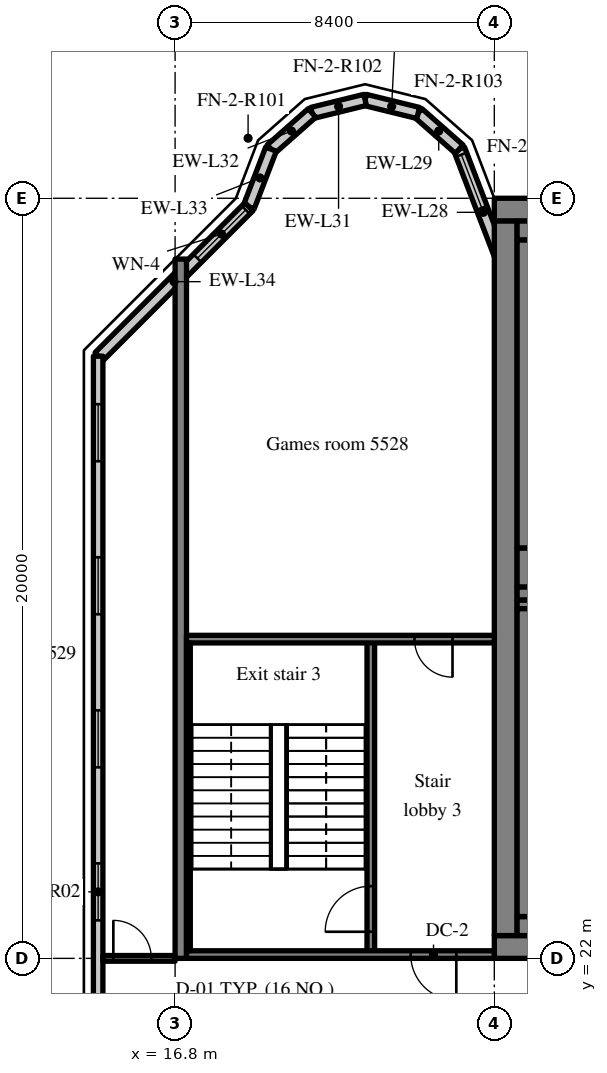
"""IFC4 building model, lengths in metres.
Left out: names, types, materials, properties, quantities, classifications, styles, units other than length and angle.
Written with IfcOpenShell. Run it as: python <this file> out.ifc"""

import sys

from ifc_helpers import new_model, si_unit, direction, frame, frame_2d, origin, place, context, subcontext, project, spatial, rectangle, extrude, source, transform, mapped, element, fill, save


model = new_model("IFC4")
c1 = context("Model", 3, precision=1e-05, world=origin(), true_north=direction((0.0, 1.0)))
c2 = subcontext(c1, "Body", "Model", "MODEL_VIEW")
j1 = project(units=[si_unit("LENGTHUNIT", "METRE"), si_unit("PLANEANGLEUNIT", "RADIAN")], contexts=[c1])
p1 = place(None, origin())
s1 = spatial("IfcSite", under=j1, at=p1, CompositionType="ELEMENT")
p2 = place(p1, origin())
s2 = spatial("IfcBuilding", under=s1, at=p2, CompositionType="ELEMENT")
p3 = place(p2, frame((0.0, 0.0, 229.6)))
s3 = spatial("IfcBuildingStorey", under=s2, at=p3, CompositionType="ELEMENT", Elevation=229.6)
m1 = source(origin(), c2, "Body", "SweptSolid", [
    extrude(rectangle(XDim=50.4, YDim=0.6, at=frame_2d((25.2, 0.0))), origin(), (0.0, 0.0, 1.0), 3.62),
])
p4 = place(p3, frame((25.2, 22.3, 0.0), z_axis=(0.0, 0.0, 1.0), x_axis=(1.0, 0.0, 0.0)))
e1 = element("IfcWall", 1, at=p4, inside=s3, PredefinedType="SHEAR", context=c2, shape_type="MappedRepresentation", body=[
    mapped(m1, transform((0.0, 0.0, 0.0), scale=1.0)),
])
m2 = source(origin(), c2, "Body", "SweptSolid", [
    extrude(rectangle(XDim=1.8, YDim=2.1, at=frame_2d((0.9, 1.05))), frame((0.0, 0.31, 0.0), z_axis=(0.0, -1.0, 0.0), x_axis=(1.0, 0.0, 0.0)), (0.0, 0.0, 1.0), 0.62),
])
p5 = place(p4, frame((15.9, 0.0, 0.0)))
e2 = element("IfcOpeningElement", 2, at=p5, cuts=e1, PredefinedType="OPENING", context=c2, shape_type="MappedRepresentation", body=[
    mapped(m2, transform((0.0, 0.0, 0.0), scale=1.0)),
])
m3 = source(origin(), c2, "Body", "SweptSolid", [
    extrude(rectangle(XDim=0.9, YDim=2.1, at=frame_2d((0.45, 1.05))), frame((0.0, 0.31, 0.0), z_axis=(0.0, -1.0, 0.0), x_axis=(1.0, 0.0, 0.0)), (0.0, 0.0, 1.0), 0.62),
])
p6 = place(p4, frame((11.187, 0.0, 0.0)))
e3 = element("IfcOpeningElement", 3, at=p6, cuts=e1, PredefinedType="OPENING", context=c2, shape_type="MappedRepresentation", body=[
    mapped(m3, transform((0.0, 0.0, 0.0), scale=1.0)),
])
p7 = place(p4, frame((21.513, 0.0, 0.0)))
e4 = element("IfcOpeningElement", 4, at=p7, cuts=e1, PredefinedType="OPENING", context=c2, shape_type="MappedRepresentation", body=[
    mapped(m3, transform((0.0, 0.0, 0.0), scale=1.0)),
])
p8 = place(p4, frame((32.7, 0.0, 0.0)))
e5 = element("IfcOpeningElement", 5, at=p8, cuts=e1, PredefinedType="OPENING", context=c2, shape_type="MappedRepresentation", body=[
    mapped(m2, transform((0.0, 0.0, 0.0), scale=1.0)),
])
m4 = source(origin(), c2, "Body", "SweptSolid", [
    extrude(rectangle(XDim=1.2, YDim=2.1, at=frame_2d((0.6, 1.05))), frame((0.0, 0.31, 0.0), z_axis=(0.0, -1.0, 0.0), x_axis=(1.0, 0.0, 0.0)), (0.0, 0.0, 1.0), 0.62),
])
p9 = place(p4, frame((6.488, 0.0, 0.0)))
e6 = element("IfcOpeningElement", 6, at=p9, cuts=e1, PredefinedType="OPENING", context=c2, shape_type="MappedRepresentation", body=[
    mapped(m4, transform((0.0, 0.0, 0.0), scale=1.0)),
])
p10 = place(p4, frame((47.925, 0.0, 0.0)))
e7 = element("IfcOpeningElement", 7, at=p10, cuts=e1, PredefinedType="OPENING", context=c2, shape_type="MappedRepresentation", body=[
    mapped(m4, transform((0.0, 0.0, 0.0), scale=1.0)),
])
p11 = place(p3, frame((25.2, 41.7, 0.0), z_axis=(0.0, 0.0, 1.0), x_axis=(1.0, 0.0, 0.0)))
e8 = element("IfcWall", 8, at=p11, inside=s3, PredefinedType="SHEAR", context=c2, shape_type="MappedRepresentation", body=[
    mapped(m1, transform((0.0, 0.0, 0.0), scale=1.0)),
])
m5 = source(origin(), c2, "Body", "SweptSolid", [
    extrude(rectangle(XDim=18.8, YDim=0.6, at=frame_2d((9.4, 0.0))), origin(), (0.0, 0.0, 1.0), 3.62),
])
p12 = place(p3, frame((25.5, 22.6, 0.0), z_axis=(0.0, 0.0, 1.0), x_axis=(0.0, 1.0, 0.0)))
e9 = element("IfcWall", 9, at=p12, inside=s3, PredefinedType="SHEAR", context=c2, shape_type="MappedRepresentation", body=[
    mapped(m5, transform((0.0, 0.0, 0.0), scale=1.0)),
])
m6 = source(origin(), c2, "Body", "SweptSolid", [
    extrude(rectangle(XDim=7.625, YDim=0.35, at=frame_2d((3.812, 0.0))), origin(), (0.0, 0.0, 1.0), 3.62),
])
p13 = place(p3, frame((25.8, 31.6, 0.0), z_axis=(0.0, 0.0, 1.0), x_axis=(1.0, 0.0, 0.0)))
e10 = element("IfcWall", 10, at=p13, inside=s3, PredefinedType="SHEAR", context=c2, shape_type="MappedRepresentation", body=[
    mapped(m6, transform((0.0, 0.0, 0.0), scale=1.0)),
])
m7 = source(origin(), c2, "Body", "SweptSolid", [
    extrude(rectangle(XDim=1.1, YDim=2.1, at=frame_2d((0.55, 1.05))), frame((0.0, 0.185, 0.0), z_axis=(0.0, -1.0, 0.0), x_axis=(1.0, 0.0, 0.0)), (0.0, 0.0, 1.0), 0.37),
])
p14 = place(p13, frame((5.938, 0.0, 0.0)))
e11 = element("IfcOpeningElement", 11, at=p14, cuts=e10, PredefinedType="OPENING", context=c2, shape_type="MappedRepresentation", body=[
    mapped(m7, transform((0.0, 0.0, 0.0), scale=1.0)),
])
m8 = source(origin(), c2, "Body", "SweptSolid", [
    extrude(rectangle(XDim=18.4, YDim=0.3, at=frame_2d((9.2, 0.0))), origin(), (0.0, 0.0, 1.0), 3.62),
])
p15 = place(p3, frame((16.95, 22.0, 0.0), z_axis=(0.0, 0.0, 1.0), x_axis=(0.0, 1.0, 0.0)))
e12 = element("IfcWall", 12, at=p15, inside=s3, PredefinedType="SHEAR", context=c2, shape_type="MappedRepresentation", body=[
    mapped(m8, transform((0.0, 0.0, 0.0), scale=1.0)),
])
m9 = source(origin(), c2, "Body", "SweptSolid", [
    extrude(rectangle(XDim=3.559, YDim=0.3, at=frame_2d((1.78, 0.0))), origin(), (0.0, 0.0, 1.0), 3.62),
])
p16 = place(p3, frame((25.55, 39.969, 0.0), z_axis=(0.0, 0.0, 1.0), x_axis=(-0.35779745313, 0.933799219604, 0.0)))
e13 = element("IfcWall", 13, at=p16, inside=s3, PredefinedType="SOLIDWALL", context=c2, shape_type="MappedRepresentation", body=[
    mapped(m9, transform((0.0, 0.0, 0.0), scale=1.0)),
])
m10 = source(origin(), c2, "Body", "SweptSolid", [
    extrude(rectangle(XDim=1.5, YDim=2.0, at=frame_2d((0.75, 1.0))), frame((0.0, 0.16, 0.0), z_axis=(0.0, -1.0, 0.0), x_axis=(1.0, 0.0, 0.0)), (0.0, 0.0, 1.0), 0.32),
])
p17 = place(p16, frame((1.903, 0.0, 0.9)))
e14 = element("IfcOpeningElement", 14, at=p17, cuts=e13, PredefinedType="OPENING", context=c2, shape_type="MappedRepresentation", body=[
    mapped(m10, transform((0.0, 0.0, 0.0), scale=1.0)),
])
m11 = source(origin(), c2, "Body", "SweptSolid", [
    extrude(rectangle(XDim=1.44, YDim=0.3, at=frame_2d((0.72, 0.0))), origin(), (0.0, 0.0, 1.0), 3.62),
])
p18 = place(p3, frame((24.277, 43.292, 0.0), z_axis=(0.0, 0.0, 1.0), x_axis=(-0.749649827867, 0.661834673902, 0.0)))
e15 = element("IfcWall", 15, at=p18, inside=s3, PredefinedType="SOLIDWALL", context=c2, shape_type="MappedRepresentation", body=[
    mapped(m11, transform((0.0, 0.0, 0.0), scale=1.0)),
])
m12 = source(origin(), c2, "Body", "SweptSolid", [
    extrude(rectangle(XDim=1.438, YDim=0.3, at=frame_2d((0.719, 0.0))), origin(), (0.0, 0.0, 1.0), 3.62),
])
p19 = place(p3, frame((23.197, 44.245, 0.0), z_axis=(0.0, 0.0, 1.0), x_axis=(-0.971152283879, 0.238460146601, 0.0)))
e16 = element("IfcWall", 16, at=p19, inside=s3, PredefinedType="SOLIDWALL", context=c2, shape_type="MappedRepresentation", body=[
    mapped(m12, transform((0.0, 0.0, 0.0), scale=1.0)),
])
m13 = source(origin(), c2, "Body", "SweptSolid", [
    extrude(rectangle(XDim=1.439, YDim=0.3, at=frame_2d((0.719, 0.0))), origin(), (0.0, 0.0, 1.0), 3.62),
])
p20 = place(p3, frame((21.8, 44.588, 0.0), z_axis=(0.0, 0.0, 1.0), x_axis=(-0.971161932466, -0.238420848351, 0.0)))
e17 = element("IfcWall", 17, at=p20, inside=s3, PredefinedType="SOLIDWALL", context=c2, shape_type="MappedRepresentation", body=[
    mapped(m13, transform((0.0, 0.0, 0.0), scale=1.0)),
])
m14 = source(origin(), c2, "Body", "SweptSolid", [
    extrude(rectangle(XDim=1.44, YDim=0.3, at=frame_2d((0.72, 0.0))), origin(), (0.0, 0.0, 1.0), 3.62),
])
p21 = place(p3, frame((20.403, 44.245, 0.0), z_axis=(0.0, 0.0, 1.0), x_axis=(-0.74957555648, -0.661918790432, 0.0)))
e18 = element("IfcWall", 18, at=p21, inside=s3, PredefinedType="SOLIDWALL", context=c2, shape_type="MappedRepresentation", body=[
    mapped(m14, transform((0.0, 0.0, 0.0), scale=1.0)),
])
m15 = source(origin(), c2, "Body", "SweptSolid", [
    extrude(rectangle(XDim=1.622, YDim=0.3, at=frame_2d((0.811, 0.0))), origin(), (0.0, 0.0, 1.0), 3.62),
])
p22 = place(p3, frame((19.323, 43.292, 0.0), z_axis=(0.0, 0.0, 1.0), x_axis=(-0.357778527068, -0.933806471154, 0.0)))
e19 = element("IfcWall", 19, at=p22, inside=s3, PredefinedType="SOLIDWALL", context=c2, shape_type="MappedRepresentation", body=[
    mapped(m15, transform((0.0, 0.0, 0.0), scale=1.0)),
])
m16 = source(origin(), c2, "Body", "SweptSolid", [
    extrude(rectangle(XDim=5.576, YDim=0.3, at=frame_2d((2.788, 0.0))), origin(), (0.0, 0.0, 1.0), 3.62),
])
p23 = place(p3, frame((18.743, 41.777, 0.0), z_axis=(0.0, 0.0, 1.0), x_axis=(-0.707106781187, -0.707106781187, 0.0)))
e20 = element("IfcWall", 20, at=p23, inside=s3, PredefinedType="SOLIDWALL", context=c2, shape_type="MappedRepresentation", body=[
    mapped(m16, transform((0.0, 0.0, 0.0), scale=1.0)),
])
m17 = source(origin(), c2, "Body", "SweptSolid", [
    extrude(rectangle(XDim=1.8, YDim=1.5, at=frame_2d((0.9, 0.75))), frame((0.0, 0.16, 0.0), z_axis=(0.0, -1.0, 0.0), x_axis=(1.0, 0.0, 0.0)), (0.0, 0.0, 1.0), 0.32),
])
p24 = place(p23, frame((0.118, 0.0, 0.9)))
e21 = element("IfcOpeningElement", 21, at=p24, cuts=e20, PredefinedType="OPENING", context=c2, shape_type="MappedRepresentation", body=[
    mapped(m17, transform((0.0, 0.0, 0.0), scale=1.0)),
])
m18 = source(origin(), c2, "Body", "SweptSolid", [
    extrude(rectangle(XDim=28.189, YDim=0.25, at=frame_2d((14.095, 0.0))), origin(), (0.0, 0.0, 1.0), 3.62),
])
p25 = place(p3, frame((14.775, 37.845, 0.0), z_axis=(0.0, 0.0, 1.0), x_axis=(0.0, -1.0, 0.0)))
e22 = element("IfcWall", 22, at=p25, inside=s3, PredefinedType="SOLIDWALL", context=c2, shape_type="MappedRepresentation", body=[
    mapped(m18, transform((0.0, 0.0, 0.0), scale=1.0)),
])
m19 = source(origin(), c2, "Body", "SweptSolid", [
    extrude(rectangle(XDim=1.5, YDim=1.5, at=frame_2d((0.75, 0.75))), frame((0.0, 0.135, 0.0), z_axis=(0.0, -1.0, 0.0), x_axis=(1.0, 0.0, 0.0)), (0.0, 0.0, 1.0), 0.27),
])
p26 = place(p25, frame((1.263, 0.0, 0.9)))
e23 = element("IfcOpeningElement", 23, at=p26, cuts=e22, PredefinedType="OPENING", context=c2, shape_type="MappedRepresentation", body=[
    mapped(m19, transform((0.0, 0.0, 0.0), scale=1.0)),
])
p27 = place(p25, frame((5.291, 0.0, 0.9)))
e24 = element("IfcOpeningElement", 24, at=p27, cuts=e22, PredefinedType="OPENING", context=c2, shape_type="MappedRepresentation", body=[
    mapped(m19, transform((0.0, 0.0, 0.0), scale=1.0)),
])
p28 = place(p25, frame((9.318, 0.0, 0.9)))
e25 = element("IfcOpeningElement", 25, at=p28, cuts=e22, PredefinedType="OPENING", context=c2, shape_type="MappedRepresentation", body=[
    mapped(m19, transform((0.0, 0.0, 0.0), scale=1.0)),
])
p29 = place(p25, frame((13.345, 0.0, 0.9)))
e26 = element("IfcOpeningElement", 26, at=p29, cuts=e22, PredefinedType="OPENING", context=c2, shape_type="MappedRepresentation", body=[
    mapped(m19, transform((0.0, 0.0, 0.0), scale=1.0)),
])
p30 = place(p25, frame((17.372, 0.0, 0.9)))
e27 = element("IfcOpeningElement", 27, at=p30, cuts=e22, PredefinedType="OPENING", context=c2, shape_type="MappedRepresentation", body=[
    mapped(m19, transform((0.0, 0.0, 0.0), scale=1.0)),
])
p31 = place(p25, frame((21.399, 0.0, 0.9)))
e28 = element("IfcOpeningElement", 28, at=p31, cuts=e22, PredefinedType="OPENING", context=c2, shape_type="MappedRepresentation", body=[
    mapped(m19, transform((0.0, 0.0, 0.0), scale=1.0)),
])
p32 = place(p25, frame((25.426, 0.0, 0.9)))
e29 = element("IfcOpeningElement", 29, at=p32, cuts=e22, PredefinedType="OPENING", context=c2, shape_type="MappedRepresentation", body=[
    mapped(m19, transform((0.0, 0.0, 0.0), scale=1.0)),
])
m20 = source(origin(), c2, "Body", "SweptSolid", [
    extrude(rectangle(XDim=8.3, YDim=0.2, at=frame_2d((4.15, 0.0))), origin(), (0.0, 0.0, 1.0), 3.62),
])
p33 = place(p3, frame((21.95, 22.1, 0.0), z_axis=(0.0, 0.0, 1.0), x_axis=(0.0, 1.0, 0.0)))
e30 = element("IfcWall", 30, at=p33, inside=s3, PredefinedType="SOLIDWALL", context=c2, shape_type="MappedRepresentation", body=[
    mapped(m20, transform((0.0, 0.0, 0.0), scale=1.0)),
])
m21 = source(origin(), c2, "Body", "SweptSolid", [
    extrude(rectangle(XDim=1.2, YDim=2.1, at=frame_2d((0.6, 1.05))), frame((0.0, 0.11, 0.0), z_axis=(0.0, -1.0, 0.0), x_axis=(1.0, 0.0, 0.0)), (0.0, 0.0, 1.0), 0.22),
])
p34 = place(p33, frame((0.6, 0.0, 0.0)))
e31 = element("IfcOpeningElement", 31, at=p34, cuts=e30, PredefinedType="OPENING", context=c2, shape_type="MappedRepresentation", body=[
    mapped(m21, transform((0.0, 0.0, 0.0), scale=1.0)),
])
m22 = source(origin(), c2, "Body", "SweptSolid", [
    extrude(rectangle(XDim=8.1, YDim=0.2, at=frame_2d((4.05, 0.0))), origin(), (0.0, 0.0, 1.0), 3.62),
])
p35 = place(p3, frame((17.1, 22.1, 0.0), z_axis=(0.0, 0.0, 1.0), x_axis=(1.0, 0.0, 0.0)))
e32 = element("IfcWall", 32, at=p35, inside=s3, PredefinedType="SOLIDWALL", context=c2, shape_type="MappedRepresentation", body=[
    mapped(m22, transform((0.0, 0.0, 0.0), scale=1.0)),
])
p36 = place(p35, frame((5.9, 0.0, 0.0)))
e33 = element("IfcOpeningElement", 33, at=p36, cuts=e32, PredefinedType="OPENING", context=c2, shape_type="MappedRepresentation", body=[
    mapped(m21, transform((0.0, 0.0, 0.0), scale=1.0)),
])
p37 = place(p3, frame((17.1, 30.4, 0.0), z_axis=(0.0, 0.0, 1.0), x_axis=(1.0, 0.0, 0.0)))
e34 = element("IfcWall", 34, at=p37, inside=s3, PredefinedType="SOLIDWALL", context=c2, shape_type="MappedRepresentation", body=[
    mapped(m22, transform((0.0, 0.0, 0.0), scale=1.0)),
])
m23 = source(origin(), c2, "Body", "SweptSolid", [
    extrude(rectangle(XDim=1.0, YDim=2.1, at=frame_2d((0.5, 1.05))), frame((0.0, 0.11, 0.0), z_axis=(0.0, -1.0, 0.0), x_axis=(1.0, 0.0, 0.0)), (0.0, 0.0, 1.0), 0.22),
])
p38 = place(p37, frame((6.0, 0.0, 0.0)))
e35 = element("IfcOpeningElement", 35, at=p38, cuts=e34, PredefinedType="OPENING", context=c2, shape_type="MappedRepresentation", body=[
    mapped(m23, transform((0.0, 0.0, 0.0), scale=1.0)),
])
m24 = source(origin(), c2, "Body", "SweptSolid", [
    extrude(rectangle(XDim=5.15, YDim=0.5, at=frame_2d((2.575, 0.0))), origin(), (0.0, 0.0, 1.0), 3.62),
])
p39 = place(p3, frame((25.8, 22.85, 0.0), z_axis=(0.0, 0.0, 1.0), x_axis=(1.0, 0.0, 0.0)))
e36 = element("IfcWall", 36, at=p39, inside=s3, PredefinedType="SOLIDWALL", context=c2, shape_type="MappedRepresentation", body=[
    mapped(m24, transform((0.0, 0.0, 0.0), scale=1.0)),
])
m25 = source(origin(), c2, "Body", "SweptSolid", [
    extrude(rectangle(XDim=5.15, YDim=0.225, at=frame_2d((2.575, 0.0))), origin(), (0.0, 0.0, 1.0), 3.62),
])
p40 = place(p3, frame((25.8, 31.312, 0.0), z_axis=(0.0, 0.0, 1.0), x_axis=(1.0, 0.0, 0.0)))
e37 = element("IfcWall", 37, at=p40, inside=s3, PredefinedType="SOLIDWALL", context=c2, shape_type="MappedRepresentation", body=[
    mapped(m25, transform((0.0, 0.0, 0.0), scale=1.0)),
])
m26 = source(origin(), c2, "Body", "SweptSolid", [
    extrude(rectangle(XDim=8.1, YDim=0.5, at=frame_2d((4.05, 0.0))), origin(), (0.0, 0.0, 1.0), 3.62),
])
p41 = place(p3, frame((26.05, 23.1, 0.0), z_axis=(0.0, 0.0, 1.0), x_axis=(0.0, 1.0, 0.0)))
e38 = element("IfcWall", 38, at=p41, inside=s3, PredefinedType="SOLIDWALL", context=c2, shape_type="MappedRepresentation", body=[
    mapped(m26, transform((0.0, 0.0, 0.0), scale=1.0)),
])
m27 = source(origin(), c2, "Body", "SweptSolid", [
    extrude(rectangle(XDim=8.1, YDim=0.1, at=frame_2d((4.05, 0.0))), origin(), (0.0, 0.0, 1.0), 3.62),
])
p42 = place(p3, frame((17.15, 22.2, 0.0), z_axis=(0.0, 0.0, 1.0), x_axis=(0.0, 1.0, 0.0)))
e39 = element("IfcWall", 39, at=p42, inside=s3, PredefinedType="SOLIDWALL", context=c2, shape_type="MappedRepresentation", body=[
    mapped(m27, transform((0.0, 0.0, 0.0), scale=1.0)),
])
p43 = place(p3, frame((25.8, 41.15, 0.0), z_axis=(0.0, 0.0, 1.0), x_axis=(1.0, 0.0, 0.0)))
e40 = element("IfcWall", 40, at=p43, inside=s3, PredefinedType="SOLIDWALL", context=c2, shape_type="MappedRepresentation", body=[
    mapped(m24, transform((0.0, 0.0, 0.0), scale=1.0)),
])
m28 = source(origin(), c2, "Body", "SweptSolid", [
    extrude(rectangle(XDim=5.15, YDim=1.025, at=frame_2d((2.575, 0.0))), origin(), (0.0, 0.0, 1.0), 3.62),
])
p44 = place(p3, frame((25.8, 32.287, 0.0), z_axis=(0.0, 0.0, 1.0), x_axis=(1.0, 0.0, 0.0)))
e41 = element("IfcWall", 41, at=p44, inside=s3, PredefinedType="SOLIDWALL", context=c2, shape_type="MappedRepresentation", body=[
    mapped(m28, transform((0.0, 0.0, 0.0), scale=1.0)),
])
p45 = place(p3, frame((26.05, 32.8, 0.0), z_axis=(0.0, 0.0, 1.0), x_axis=(0.0, 1.0, 0.0)))
e42 = element("IfcWall", 42, at=p45, inside=s3, PredefinedType="SOLIDWALL", context=c2, shape_type="MappedRepresentation", body=[
    mapped(m26, transform((0.0, 0.0, 0.0), scale=1.0)),
])
m29 = source(origin(), c2, "Body", "SweptSolid", [
    extrude(rectangle(XDim=1.9, YDim=0.15, at=frame_2d((0.95, 0.0))), origin(), (0.0, 0.0, 1.0), 2.92),
])
p46 = place(p3, frame((14.9, 22.0, 0.0), z_axis=(0.0, 0.0, 1.0), x_axis=(1.0, 0.0, 0.0)))
e43 = element("IfcWall", 43, at=p46, inside=s3, PredefinedType="PARTITIONING", context=c2, shape_type="MappedRepresentation", body=[
    mapped(m29, transform((0.0, 0.0, 0.0), scale=1.0)),
])
m30 = source(origin(), c2, "Body", "SweptSolid", [
    extrude(rectangle(XDim=1.0, YDim=2.1, at=frame_2d((0.5, 1.05))), frame((0.0, 0.085, 0.0), z_axis=(0.0, -1.0, 0.0), x_axis=(1.0, 0.0, 0.0)), (0.0, 0.0, 1.0), 0.17),
])
p47 = place(p46, frame((0.275, 0.0, 0.0)))
e44 = element("IfcOpeningElement", 44, at=p47, cuts=e43, PredefinedType="OPENING", context=c2, shape_type="MappedRepresentation", body=[
    mapped(m30, transform((0.0, 0.0, 0.0), scale=1.0)),
])
m31 = source(origin(), c2, "Body", "SweptSolid", [
    extrude(rectangle(XDim=1.5, YDim=2.0, at=frame_2d((0.75, 1.0))), frame((0.0, 0.03, 0.0), z_axis=(0.0, -1.0, 0.0), x_axis=(1.0, 0.0, 0.0)), (0.0, 0.0, 1.0), 0.06),
])
p48 = place(p17, origin())
e45 = element("IfcWindow", 45, at=p48, inside=s3, PartitioningType="SINGLE_PANEL", PredefinedType="WINDOW", context=c2, shape_type="MappedRepresentation", body=[
    mapped(m31, transform((0.0, 0.0, 0.0), scale=1.0)),
])
fill(e14, e45)
m32 = source(origin(), c2, "Body", "SweptSolid", [
    extrude(rectangle(XDim=1.8, YDim=1.5, at=frame_2d((0.9, 0.75))), frame((0.0, 0.03, 0.0), z_axis=(0.0, -1.0, 0.0), x_axis=(1.0, 0.0, 0.0)), (0.0, 0.0, 1.0), 0.06),
])
p49 = place(p24, origin())
e46 = element("IfcWindow", 46, at=p49, inside=s3, PartitioningType="SINGLE_PANEL", PredefinedType="WINDOW", context=c2, shape_type="MappedRepresentation", body=[
    mapped(m32, transform((0.0, 0.0, 0.0), scale=1.0)),
])
fill(e21, e46)
m33 = source(origin(), c2, "Body", "SweptSolid", [
    extrude(rectangle(XDim=1.5, YDim=1.5, at=frame_2d((0.75, 0.75))), frame((0.0, 0.03, 0.0), z_axis=(0.0, -1.0, 0.0), x_axis=(1.0, 0.0, 0.0)), (0.0, 0.0, 1.0), 0.06),
])
p50 = place(p26, origin())
e47 = element("IfcWindow", 47, at=p50, inside=s3, PartitioningType="SINGLE_PANEL", PredefinedType="WINDOW", context=c2, shape_type="MappedRepresentation", body=[
    mapped(m33, transform((0.0, 0.0, 0.0), scale=1.0)),
])
fill(e23, e47)
p51 = place(p27, origin())
e48 = element("IfcWindow", 48, at=p51, inside=s3, PartitioningType="SINGLE_PANEL", PredefinedType="WINDOW", context=c2, shape_type="MappedRepresentation", body=[
    mapped(m33, transform((0.0, 0.0, 0.0), scale=1.0)),
])
fill(e24, e48)
p52 = place(p28, origin())
e49 = element("IfcWindow", 49, at=p52, inside=s3, PartitioningType="SINGLE_PANEL", PredefinedType="WINDOW", context=c2, shape_type="MappedRepresentation", body=[
    mapped(m33, transform((0.0, 0.0, 0.0), scale=1.0)),
])
fill(e25, e49)
p53 = place(p29, origin())
e50 = element("IfcWindow", 50, at=p53, inside=s3, PartitioningType="SINGLE_PANEL", PredefinedType="WINDOW", context=c2, shape_type="MappedRepresentation", body=[
    mapped(m33, transform((0.0, 0.0, 0.0), scale=1.0)),
])
fill(e26, e50)
m34 = source(origin(), c2, "Body", "SweptSolid", [
    extrude(rectangle(XDim=1.2, YDim=2.1, at=frame_2d((0.6, 1.05))), frame((0.0, 0.025, 0.0), z_axis=(0.0, -1.0, 0.0), x_axis=(1.0, 0.0, 0.0)), (0.0, 0.0, 1.0), 0.05),
])
p54 = place(p34, origin())
e51 = element("IfcDoor", 51, at=p54, inside=s3, OperationType="SINGLE_SWING_LEFT", PredefinedType="DOOR", context=c2, shape_type="MappedRepresentation", body=[
    mapped(m34, transform((0.0, 0.0, 0.0), scale=1.0)),
])
fill(e31, e51)
p55 = place(p36, origin())
e52 = element("IfcDoor", 52, at=p55, inside=s3, OperationType="SINGLE_SWING_RIGHT", PredefinedType="DOOR", context=c2, shape_type="MappedRepresentation", body=[
    mapped(m34, transform((0.0, 0.0, 0.0), scale=1.0)),
])
fill(e33, e52)
m35 = source(origin(), c2, "Body", "SweptSolid", [
    extrude(rectangle(XDim=1.0, YDim=2.1, at=frame_2d((0.5, 1.05))), frame((0.0, 0.025, 0.0), z_axis=(0.0, -1.0, 0.0), x_axis=(1.0, 0.0, 0.0)), (0.0, 0.0, 1.0), 0.05),
])
p56 = place(p38, origin())
e53 = element("IfcDoor", 53, at=p56, inside=s3, OperationType="SINGLE_SWING_RIGHT", PredefinedType="DOOR", context=c2, shape_type="MappedRepresentation", body=[
    mapped(m35, transform((0.0, 0.0, 0.0), scale=1.0)),
])
fill(e35, e53)
p57 = place(p47, origin())
e54 = element("IfcDoor", 54, at=p57, inside=s3, OperationType="SINGLE_SWING_LEFT", PredefinedType="DOOR", context=c2, shape_type="MappedRepresentation", body=[
    mapped(m35, transform((0.0, 0.0, 0.0), scale=1.0)),
])
fill(e44, e54)
save(model, sys.argv[1])
